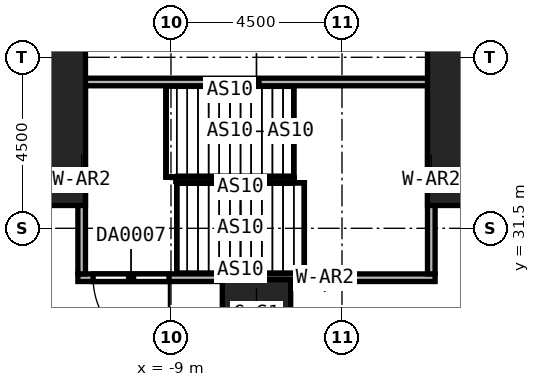
"""IFC4 building model, lengths in metres.
Left out: names, types, materials, properties, quantities, classifications, styles, units other than length and angle.
Written with IfcOpenShell. Run it as: python <this file> out.ifc"""

import sys

from ifc_helpers import new_model, si_unit, direction, frame, frame_2d, origin, origin_2d, place, context, subcontext, project, spatial, rectangle, extrude, element, fill, save


model = new_model("IFC4")
c1 = context("Model", 3, precision=1e-05, world=origin(), true_north=direction((0.0, 1.0)))
c2 = subcontext(c1, "Body", "Model", "MODEL_VIEW")
j1 = project(units=[si_unit("LENGTHUNIT", "METRE"), si_unit("PLANEANGLEUNIT", "RADIAN")], contexts=[c1])
p1 = place(None, origin())
s1 = spatial("IfcSite", under=j1, at=p1, CompositionType="ELEMENT")
p2 = place(p1, origin())
s2 = spatial("IfcBuilding", under=s1, at=p2, CompositionType="ELEMENT")
p3 = place(p2, origin())
s3 = spatial("IfcBuildingStorey", under=s2, at=p3, CompositionType="ELEMENT", Elevation=0.0)
for number, where, z_axis, x_axis in (
    (1, (-13.5, 35.55, 0.0), (0.0, 0.0, 1.0), (1.0, 0.0, 0.0)),
    (2, (0.0, 35.55, 0.0), (0.0, 0.0, 1.0), (1.0, 0.0, 0.0)),
):
    element("IfcColumn", number, at=place(p3, frame(where, z_axis=z_axis, x_axis=x_axis)), inside=s3, PredefinedType="COLUMN", context=c2, shape_type="SweptSolid", body=[
        extrude(rectangle(XDim=4.5, YDim=6.9, at=origin_2d()), origin(), (0.0, 0.0, 1.0), 12.0),
    ])
p4 = place(p3, frame((-6.75, 29.25, 0.0), z_axis=(0.0, 0.0, 1.0), x_axis=(1.0, 0.0, 0.0)))
e3 = element("IfcColumn", 3, at=p4, inside=s3, PredefinedType="COLUMN", context=c2, shape_type="SweptSolid", body=[
    extrude(rectangle(XDim=1.8, YDim=1.8, at=origin_2d()), origin(), (0.0, 0.0, 1.0), 12.0),
])
p5 = place(p3, frame((-2.05, 30.2, 0.0), z_axis=(0.0, 0.0, 1.0), x_axis=(-1.0, 0.0, 0.0)))
e4 = element("IfcWall", 4, at=p5, inside=s3, PredefinedType="SOLIDWALL", context=c2, shape_type="SweptSolid", body=[
    extrude(rectangle(XDim=9.4, YDim=0.2, at=frame_2d((4.7, 0.0))), origin(), (0.0, 0.0, 1.0), 12.0),
])
p6 = place(p5, frame((7.0, 0.0, 0.0)))
e5 = element("IfcOpeningElement", 5, at=p6, cuts=e4, PredefinedType="OPENING", context=c2, shape_type="SweptSolid", body=[
    extrude(rectangle(XDim=2.0, YDim=2.4, at=frame_2d((1.0, 1.2))), frame((0.0, 0.1, 0.0), z_axis=(0.0, -1.0, 0.0), x_axis=(1.0, 0.0, 0.0)), (0.0, 0.0, 1.0), 0.2),
])
p7 = place(p3, frame((-11.45, 35.35, 0.0), z_axis=(0.0, 0.0, 1.0), x_axis=(1.0, 0.0, 0.0)))
e6 = element("IfcWall", 6, at=p7, inside=s3, PredefinedType="SOLIDWALL", context=c2, shape_type="SweptSolid", body=[
    extrude(rectangle(XDim=9.4, YDim=0.2, at=frame_2d((4.7, 0.0))), origin(), (0.0, 0.0, 1.0), 12.0),
])
for number, where, z_axis, x_axis in (
    (7, (-11.35, 30.3, 0.0), (0.0, 0.0, 1.0), (0.0, 1.0, 0.0)),
    (8, (-2.15, 30.3, 0.0), (0.0, 0.0, 1.0), (0.0, 1.0, 0.0)),
):
    element("IfcWall", number, at=place(p3, frame(where, z_axis=z_axis, x_axis=x_axis)), inside=s3, PredefinedType="SOLIDWALL", context=c2, shape_type="SweptSolid", body=[
        extrude(rectangle(XDim=4.95, YDim=0.2, at=frame_2d((2.475, 0.0))), origin(), (0.0, 0.0, 1.0), 12.0),
    ])
p8 = place(p6, origin())
e9 = element("IfcDoor", 9, at=p8, inside=s3, OperationType="DOUBLE_DOOR_SINGLE_SWING", PredefinedType="DOOR", context=c2, shape_type="SweptSolid", body=[
    extrude(rectangle(XDim=2.0, YDim=2.4, at=frame_2d((1.0, 1.2))), frame((0.0, 0.025, 0.0), z_axis=(0.0, -1.0, 0.0), x_axis=(1.0, 0.0, 0.0)), (0.0, 0.0, 1.0), 0.05),
])
fill(e5, e9)
save(model, sys.argv[1])
